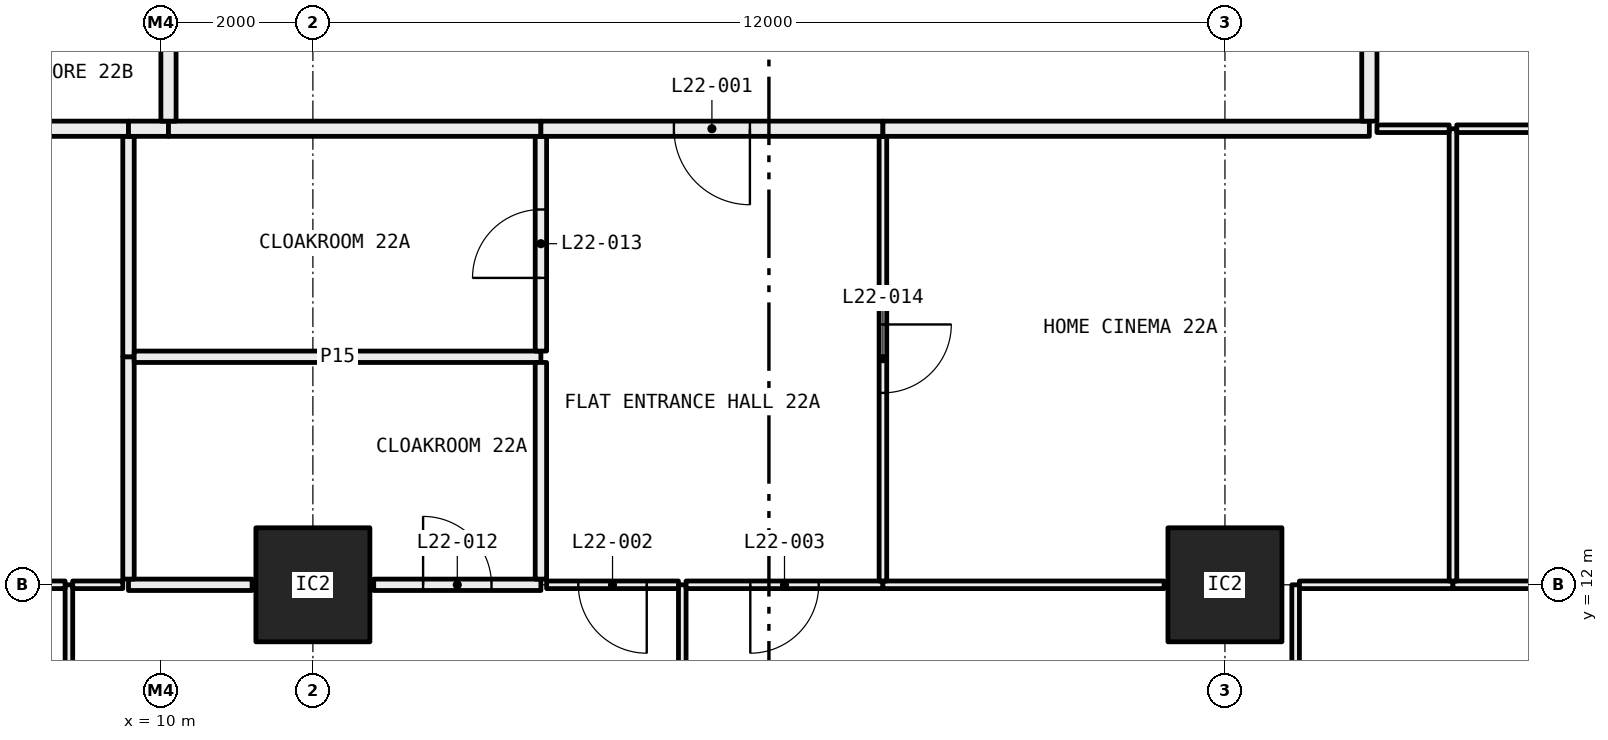
"""IFC4 building model, lengths in metres.
Left out: names, types, materials, properties, quantities, classifications, styles, units other than length and angle.
Written with IfcOpenShell. Run it as: python <this file> out.ifc"""

import sys

from ifc_helpers import new_model, si_unit, direction, frame, frame_2d, origin, origin_2d, place, context, subcontext, project, spatial, rectangle, hollow_rectangle, extrude, element, fill, save


model = new_model("IFC4")
c1 = context("Model", 3, precision=1e-05, world=origin(), true_north=direction((0.0, 1.0)))
c2 = subcontext(c1, "Body", "Model", "MODEL_VIEW")
j1 = project(units=[si_unit("LENGTHUNIT", "METRE"), si_unit("PLANEANGLEUNIT", "RADIAN")], contexts=[c1])
p1 = place(None, origin())
s1 = spatial("IfcSite", under=j1, at=p1, CompositionType="ELEMENT")
p2 = place(p1, origin())
s2 = spatial("IfcBuilding", under=s1, at=p2, CompositionType="ELEMENT")
p3 = place(p2, frame((0.0, 0.0, 88.65)))
s3 = spatial("IfcBuildingStorey", under=s2, at=p3, CompositionType="ELEMENT", Elevation=88.65)
for number, where, z_axis, x_axis in (
    (1, (12.0, 12.0, 0.0), (0.0, 0.0, 1.0), (1.0, 0.0, 0.0)),
    (2, (24.0, 12.0, 0.0), (0.0, 0.0, 1.0), (1.0, 0.0, 0.0)),
):
    element("IfcColumn", number, at=place(p3, frame(where, z_axis=z_axis, x_axis=x_axis)), inside=s3, PredefinedType="COLUMN", context=c2, shape_type="SweptSolid", body=[
        extrude(hollow_rectangle(XDim=1.5, YDim=1.5, WallThickness=0.065, at=origin_2d()), origin(), (0.0, 0.0, 1.0), 3.05),
    ])
p4 = place(p3, frame((8.79, 6.05, 0.0), z_axis=(0.0, 0.0, 1.0), x_axis=(0.0, 1.0, 0.0)))
e3 = element("IfcWall", 3, at=p4, inside=s3, PredefinedType="PARTITIONING", context=c2, shape_type="SweptSolid", body=[
    extrude(rectangle(XDim=5.95, YDim=0.1, at=frame_2d((2.975, 0.0))), origin(), (0.0, 0.0, 1.0), 2.45),
])
p5 = place(p4, frame((2.525, 0.0, 0.0)))
e4 = element("IfcOpeningElement", 4, at=p5, cuts=e3, PredefinedType="OPENING", context=c2, shape_type="SweptSolid", body=[
    extrude(rectangle(XDim=0.9, YDim=2.1, at=frame_2d((0.45, 1.05))), frame((0.0, 0.06, 0.0), z_axis=(0.0, -1.0, 0.0), x_axis=(1.0, 0.0, 0.0)), (0.0, 0.0, 1.0), 0.12),
])
p6 = place(p3, frame((8.74, 12.0, 0.0), z_axis=(0.0, 0.0, 1.0), x_axis=(-1.0, 0.0, 0.0)))
e5 = element("IfcWall", 5, at=p6, inside=s3, PredefinedType="PARTITIONING", context=c2, shape_type="SweptSolid", body=[
    extrude(rectangle(XDim=8.02, YDim=0.1, at=frame_2d((4.01, 0.0))), origin(), (0.0, 0.0, 1.0), 2.45),
])
p7 = place(p6, frame((3.56, 0.0, 0.0)))
e6 = element("IfcOpeningElement", 6, at=p7, cuts=e5, PredefinedType="OPENING", context=c2, shape_type="SweptSolid", body=[
    extrude(rectangle(XDim=0.9, YDim=2.1, at=frame_2d((0.45, 1.05))), frame((0.0, 0.06, 0.0), z_axis=(0.0, -1.0, 0.0), x_axis=(1.0, 0.0, 0.0)), (0.0, 0.0, 1.0), 0.12),
])
p8 = place(p3, frame((16.86, 6.05, 0.0), z_axis=(0.0, 0.0, 1.0), x_axis=(0.0, 1.0, 0.0)))
e7 = element("IfcWall", 7, at=p8, inside=s3, PredefinedType="PARTITIONING", context=c2, shape_type="SweptSolid", body=[
    extrude(rectangle(XDim=5.95, YDim=0.1, at=frame_2d((2.975, 0.0))), origin(), (0.0, 0.0, 1.0), 2.45),
])
p9 = place(p3, frame((9.499, 12.0, 0.0), z_axis=(0.0, 0.0, 1.0), x_axis=(-1.0, 0.0, 0.0)))
e8 = element("IfcWall", 8, at=p9, inside=s3, PredefinedType="PARTITIONING", context=c2, shape_type="SweptSolid", body=[
    extrude(rectangle(XDim=0.659, YDim=0.1, at=frame_2d((0.33, 0.0))), origin(), (0.0, 0.0, 1.0), 2.45),
])
p10 = place(p3, frame((11.2, 12.0, 0.0), z_axis=(0.0, 0.0, 1.0), x_axis=(-1.0, 0.0, 0.0)))
e9 = element("IfcWall", 9, at=p10, inside=s3, PredefinedType="PARTITIONING", context=c2, shape_type="SweptSolid", body=[
    extrude(rectangle(XDim=1.626, YDim=0.15, at=frame_2d((0.813, 0.0))), origin(), (0.0, 0.0, 1.0), 2.45),
])
p11 = place(p3, frame((15.0, 12.0, 0.0), z_axis=(0.0, 0.0, 1.0), x_axis=(-1.0, 0.0, 0.0)))
e10 = element("IfcWall", 10, at=p11, inside=s3, PredefinedType="PARTITIONING", context=c2, shape_type="SweptSolid", body=[
    extrude(rectangle(XDim=2.2, YDim=0.15, at=frame_2d((1.1, 0.0))), origin(), (0.0, 0.0, 1.0), 2.45),
])
p12 = place(p11, frame((0.65, 0.0, 0.0)))
e11 = element("IfcOpeningElement", 11, at=p12, cuts=e10, PredefinedType="OPENING", context=c2, shape_type="SweptSolid", body=[
    extrude(rectangle(XDim=0.9, YDim=2.1, at=frame_2d((0.45, 1.05))), frame((0.0, 0.085, 0.0), z_axis=(0.0, -1.0, 0.0), x_axis=(1.0, 0.0, 0.0)), (0.0, 0.0, 1.0), 0.17),
])
p13 = place(p3, frame((16.81, 12.0, 0.0), z_axis=(0.0, 0.0, 1.0), x_axis=(-1.0, 0.0, 0.0)))
e12 = element("IfcWall", 12, at=p13, inside=s3, PredefinedType="PARTITIONING", context=c2, shape_type="SweptSolid", body=[
    extrude(rectangle(XDim=1.735, YDim=0.1, at=frame_2d((0.868, 0.0))), origin(), (0.0, 0.0, 1.0), 2.45),
])
p14 = place(p13, frame((0.417, 0.0, 0.0)))
e13 = element("IfcOpeningElement", 13, at=p14, cuts=e12, PredefinedType="OPENING", context=c2, shape_type="SweptSolid", body=[
    extrude(rectangle(XDim=0.9, YDim=2.1, at=frame_2d((0.45, 1.05))), frame((0.0, 0.06, 0.0), z_axis=(0.0, -1.0, 0.0), x_axis=(1.0, 0.0, 0.0)), (0.0, 0.0, 1.0), 0.12),
])
p15 = place(p3, frame((24.93, 6.05, 0.0), z_axis=(0.0, 0.0, 1.0), x_axis=(0.0, 1.0, 0.0)))
e14 = element("IfcWall", 14, at=p15, inside=s3, PredefinedType="PARTITIONING", context=c2, shape_type="SweptSolid", body=[
    extrude(rectangle(XDim=5.95, YDim=0.1, at=frame_2d((2.975, 0.0))), origin(), (0.0, 0.0, 1.0), 2.45),
])
p16 = place(p15, frame((2.525, 0.0, 0.0)))
e15 = element("IfcOpeningElement", 15, at=p16, cuts=e14, PredefinedType="OPENING", context=c2, shape_type="SweptSolid", body=[
    extrude(rectangle(XDim=0.9, YDim=2.1, at=frame_2d((0.45, 1.05))), frame((0.0, 0.06, 0.0), z_axis=(0.0, -1.0, 0.0), x_axis=(1.0, 0.0, 0.0)), (0.0, 0.0, 1.0), 0.12),
])
p17 = place(p3, frame((19.5, 12.0, 0.0), z_axis=(0.0, 0.0, 1.0), x_axis=(-1.0, 0.0, 0.0)))
e16 = element("IfcWall", 16, at=p17, inside=s3, PredefinedType="PARTITIONING", context=c2, shape_type="SweptSolid", body=[
    extrude(rectangle(XDim=2.59, YDim=0.1, at=frame_2d((1.295, 0.0))), origin(), (0.0, 0.0, 1.0), 2.45),
])
p18 = place(p17, frame((0.845, 0.0, 0.0)))
e17 = element("IfcOpeningElement", 17, at=p18, cuts=e16, PredefinedType="OPENING", context=c2, shape_type="SweptSolid", body=[
    extrude(rectangle(XDim=0.9, YDim=2.1, at=frame_2d((0.45, 1.05))), frame((0.0, 0.06, 0.0), z_axis=(0.0, -1.0, 0.0), x_axis=(1.0, 0.0, 0.0)), (0.0, 0.0, 1.0), 0.12),
])
p19 = place(p3, frame((23.2, 12.0, 0.0), z_axis=(0.0, 0.0, 1.0), x_axis=(-1.0, 0.0, 0.0)))
e18 = element("IfcWall", 18, at=p19, inside=s3, PredefinedType="PARTITIONING", context=c2, shape_type="SweptSolid", body=[
    extrude(rectangle(XDim=3.7, YDim=0.1, at=frame_2d((1.85, 0.0))), origin(), (0.0, 0.0, 1.0), 2.45),
])
p20 = place(p3, frame((27.0, 12.0, 0.0), z_axis=(0.0, 0.0, 1.0), x_axis=(-1.0, 0.0, 0.0)))
e19 = element("IfcWall", 19, at=p20, inside=s3, PredefinedType="PARTITIONING", context=c2, shape_type="SweptSolid", body=[
    extrude(rectangle(XDim=2.02, YDim=0.1, at=frame_2d((1.01, 0.0))), origin(), (0.0, 0.0, 1.0), 2.45),
])
p21 = place(p3, frame((32.95, 12.0, 0.0), z_axis=(0.0, 0.0, 1.0), x_axis=(-1.0, 0.0, 0.0)))
e20 = element("IfcWall", 20, at=p21, inside=s3, PredefinedType="PARTITIONING", context=c2, shape_type="SweptSolid", body=[
    extrude(rectangle(XDim=5.95, YDim=0.1, at=frame_2d((2.975, 0.0))), origin(), (0.0, 0.0, 1.0), 2.45),
])
p22 = place(p21, frame((2.525, 0.0, 0.0)))
e21 = element("IfcOpeningElement", 21, at=p22, cuts=e20, PredefinedType="OPENING", context=c2, shape_type="SweptSolid", body=[
    extrude(rectangle(XDim=0.9, YDim=2.1, at=frame_2d((0.45, 1.05))), frame((0.0, 0.06, 0.0), z_axis=(0.0, -1.0, 0.0), x_axis=(1.0, 0.0, 0.0)), (0.0, 0.0, 1.0), 0.12),
])
p23 = place(p3, frame((9.574, 12.075, 0.0), z_axis=(0.0, 0.0, 1.0), x_axis=(0.0, 1.0, 0.0)))
e22 = element("IfcWall", 22, at=p23, inside=s3, PredefinedType="PARTITIONING", context=c2, shape_type="SweptSolid", body=[
    extrude(rectangle(XDim=2.925, YDim=0.15, at=frame_2d((1.462, 0.0))), origin(), (0.0, 0.0, 1.0), 2.45),
])
p24 = place(p3, frame((9.574, 15.0, 0.0), z_axis=(0.0, 0.0, 1.0), x_axis=(0.0, 1.0, 0.0)))
e23 = element("IfcWall", 23, at=p24, inside=s3, PredefinedType="PARTITIONING", context=c2, shape_type="SweptSolid", body=[
    extrude(rectangle(XDim=2.9, YDim=0.15, at=frame_2d((1.45, 0.0))), origin(), (0.0, 0.0, 1.0), 3.05),
])
p25 = place(p3, frame((9.574, 18.0, 0.0), z_axis=(0.0, 0.0, 1.0), x_axis=(-1.0, 0.0, 0.0)))
e24 = element("IfcWall", 24, at=p25, inside=s3, PredefinedType="PARTITIONING", context=c2, shape_type="SweptSolid", body=[
    extrude(rectangle(XDim=1.774, YDim=0.2, at=frame_2d((0.887, 0.0))), origin(), (0.0, 0.0, 1.0), 3.05),
])
p26 = place(p3, frame((15.0, 15.0, 0.0), z_axis=(0.0, 0.0, 1.0), x_axis=(-1.0, 0.0, 0.0)))
e25 = element("IfcWall", 25, at=p26, inside=s3, PredefinedType="PARTITIONING", context=c2, shape_type="SweptSolid", body=[
    extrude(rectangle(XDim=5.351, YDim=0.15, at=frame_2d((2.676, 0.0))), origin(), (0.0, 0.0, 1.0), 3.05),
])
p27 = place(p3, frame((15.0, 12.075, 0.0), z_axis=(0.0, 0.0, 1.0), x_axis=(0.0, 1.0, 0.0)))
e26 = element("IfcWall", 26, at=p27, inside=s3, PredefinedType="PARTITIONING", context=c2, shape_type="SweptSolid", body=[
    extrude(rectangle(XDim=2.85, YDim=0.15, at=frame_2d((1.425, 0.0))), origin(), (0.0, 0.0, 1.0), 2.45),
])
p28 = place(p3, frame((15.0, 15.075, 0.0), z_axis=(0.0, 0.0, 1.0), x_axis=(0.0, 1.0, 0.0)))
e27 = element("IfcWall", 27, at=p28, inside=s3, PredefinedType="PARTITIONING", context=c2, shape_type="SweptSolid", body=[
    extrude(rectangle(XDim=2.825, YDim=0.15, at=frame_2d((1.413, 0.0))), origin(), (0.0, 0.0, 1.0), 3.05),
])
p29 = place(p28, frame((0.962, 0.0, 0.0)))
e28 = element("IfcOpeningElement", 28, at=p29, cuts=e27, PredefinedType="OPENING", context=c2, shape_type="SweptSolid", body=[
    extrude(rectangle(XDim=0.9, YDim=2.1, at=frame_2d((0.45, 1.05))), frame((0.0, 0.085, 0.0), z_axis=(0.0, -1.0, 0.0), x_axis=(1.0, 0.0, 0.0)), (0.0, 0.0, 1.0), 0.17),
])
p30 = place(p3, frame((10.1, 18.0, 0.0), z_axis=(0.0, 0.0, 1.0), x_axis=(-1.0, 0.0, 0.0)))
e29 = element("IfcWall", 29, at=p30, inside=s3, PredefinedType="PARTITIONING", context=c2, shape_type="SweptSolid", body=[
    extrude(rectangle(XDim=0.526, YDim=0.2, at=frame_2d((0.263, 0.0))), origin(), (0.0, 0.0, 1.0), 3.05),
])
p31 = place(p3, frame((15.0, 18.0, 0.0), z_axis=(0.0, 0.0, 1.0), x_axis=(-1.0, 0.0, 0.0)))
e30 = element("IfcWall", 30, at=p31, inside=s3, PredefinedType="PARTITIONING", context=c2, shape_type="SweptSolid", body=[
    extrude(rectangle(XDim=4.9, YDim=0.2, at=frame_2d((2.45, 0.0))), origin(), (0.0, 0.0, 1.0), 3.05),
])
p32 = place(p3, frame((19.5, 12.05, 0.0), z_axis=(0.0, 0.0, 1.0), x_axis=(0.0, 1.0, 0.0)))
e31 = element("IfcWall", 31, at=p32, inside=s3, PredefinedType="PARTITIONING", context=c2, shape_type="SweptSolid", body=[
    extrude(rectangle(XDim=5.85, YDim=0.1, at=frame_2d((2.925, 0.0))), origin(), (0.0, 0.0, 1.0), 2.45),
])
p33 = place(p32, frame((2.475, 0.0, 0.0)))
e32 = element("IfcOpeningElement", 32, at=p33, cuts=e31, PredefinedType="OPENING", context=c2, shape_type="SweptSolid", body=[
    extrude(rectangle(XDim=0.9, YDim=2.1, at=frame_2d((0.45, 1.05))), frame((0.0, 0.06, 0.0), z_axis=(0.0, -1.0, 0.0), x_axis=(1.0, 0.0, 0.0)), (0.0, 0.0, 1.0), 0.12),
])
p34 = place(p3, frame((19.5, 18.0, 0.0), z_axis=(0.0, 0.0, 1.0), x_axis=(-1.0, 0.0, 0.0)))
e33 = element("IfcWall", 33, at=p34, inside=s3, PredefinedType="PARTITIONING", context=c2, shape_type="SweptSolid", body=[
    extrude(rectangle(XDim=4.5, YDim=0.2, at=frame_2d((2.25, 0.0))), origin(), (0.0, 0.0, 1.0), 3.05),
])
p35 = place(p34, frame((1.75, 0.0, 0.0)))
e34 = element("IfcOpeningElement", 34, at=p35, cuts=e33, PredefinedType="OPENING", context=c2, shape_type="SweptSolid", body=[
    extrude(rectangle(XDim=1.0, YDim=2.1, at=frame_2d((0.5, 1.05))), frame((0.0, 0.11, 0.0), z_axis=(0.0, -1.0, 0.0), x_axis=(1.0, 0.0, 0.0)), (0.0, 0.0, 1.0), 0.22),
])
p36 = place(p3, frame((27.0, 12.05, 0.0), z_axis=(0.0, 0.0, 1.0), x_axis=(0.0, 1.0, 0.0)))
e35 = element("IfcWall", 35, at=p36, inside=s3, PredefinedType="PARTITIONING", context=c2, shape_type="SweptSolid", body=[
    extrude(rectangle(XDim=5.95, YDim=0.1, at=frame_2d((2.975, 0.0))), origin(), (0.0, 0.0, 1.0), 2.45),
])
p37 = place(p3, frame((26.95, 18.0, 0.0), z_axis=(0.0, 0.0, 1.0), x_axis=(-1.0, 0.0, 0.0)))
e36 = element("IfcWall", 36, at=p37, inside=s3, PredefinedType="PARTITIONING", context=c2, shape_type="SweptSolid", body=[
    extrude(rectangle(XDim=0.95, YDim=0.1, at=frame_2d((0.475, 0.0))), origin(), (0.0, 0.0, 1.0), 3.05),
])
p38 = place(p3, frame((25.9, 18.0, 0.0), z_axis=(0.0, 0.0, 1.0), x_axis=(-1.0, 0.0, 0.0)))
e37 = element("IfcWall", 37, at=p38, inside=s3, PredefinedType="PARTITIONING", context=c2, shape_type="SweptSolid", body=[
    extrude(rectangle(XDim=6.4, YDim=0.2, at=frame_2d((3.2, 0.0))), origin(), (0.0, 0.0, 1.0), 3.05),
])
p39 = place(p3, frame((30.0, 18.0, 0.0), z_axis=(0.0, 0.0, 1.0), x_axis=(-1.0, 0.0, 0.0)))
e38 = element("IfcWall", 38, at=p39, inside=s3, PredefinedType="PARTITIONING", context=c2, shape_type="SweptSolid", body=[
    extrude(rectangle(XDim=2.95, YDim=0.1, at=frame_2d((1.475, 0.0))), origin(), (0.0, 0.0, 1.0), 3.05),
])
p40 = place(p39, frame((1.025, 0.0, 0.0)))
e39 = element("IfcOpeningElement", 39, at=p40, cuts=e38, PredefinedType="OPENING", context=c2, shape_type="SweptSolid", body=[
    extrude(rectangle(XDim=0.9, YDim=2.1, at=frame_2d((0.45, 1.05))), frame((0.0, 0.06, 0.0), z_axis=(0.0, -1.0, 0.0), x_axis=(1.0, 0.0, 0.0)), (0.0, 0.0, 1.0), 0.12),
])
p41 = place(p3, frame((25.9, 23.9, 0.0), z_axis=(0.0, 0.0, 1.0), x_axis=(0.0, -1.0, 0.0)))
e40 = element("IfcWall", 40, at=p41, inside=s3, PredefinedType="PARTITIONING", context=c2, shape_type="SweptSolid", body=[
    extrude(rectangle(XDim=5.8, YDim=0.2, at=frame_2d((2.9, 0.0))), origin(), (0.0, 0.0, 1.0), 3.05),
])
p42 = place(p3, frame((10.1, 18.1, 0.0), z_axis=(0.0, 0.0, 1.0), x_axis=(0.0, 1.0, 0.0)))
e41 = element("IfcWall", 41, at=p42, inside=s3, PredefinedType="PARTITIONING", context=c2, shape_type="SweptSolid", body=[
    extrude(rectangle(XDim=2.9, YDim=0.2, at=frame_2d((1.45, 0.0))), origin(), (0.0, 0.0, 1.0), 3.05),
])
p43 = place(p35, origin())
e42 = element("IfcDoor", 42, at=p43, inside=s3, OperationType="SINGLE_SWING_RIGHT", PredefinedType="DOOR", context=c2, shape_type="SweptSolid", body=[
    extrude(rectangle(XDim=1.0, YDim=2.1, at=frame_2d((0.5, 1.05))), frame((0.0, 0.025, 0.0), z_axis=(0.0, -1.0, 0.0), x_axis=(1.0, 0.0, 0.0)), (0.0, 0.0, 1.0), 0.05),
])
fill(e34, e42)
p44 = place(p14, origin())
e43 = element("IfcDoor", 43, at=p44, inside=s3, OperationType="SINGLE_SWING_RIGHT", PredefinedType="DOOR", context=c2, shape_type="SweptSolid", body=[
    extrude(rectangle(XDim=0.9, YDim=2.1, at=frame_2d((0.45, 1.05))), frame((0.0, 0.025, 0.0), z_axis=(0.0, -1.0, 0.0), x_axis=(1.0, 0.0, 0.0)), (0.0, 0.0, 1.0), 0.05),
])
fill(e13, e43)
p45 = place(p18, origin())
e44 = element("IfcDoor", 44, at=p45, inside=s3, OperationType="SINGLE_SWING_LEFT", PredefinedType="DOOR", context=c2, shape_type="SweptSolid", body=[
    extrude(rectangle(XDim=0.9, YDim=2.1, at=frame_2d((0.45, 1.05))), frame((0.0, 0.025, 0.0), z_axis=(0.0, -1.0, 0.0), x_axis=(1.0, 0.0, 0.0)), (0.0, 0.0, 1.0), 0.05),
])
fill(e17, e44)
p46 = place(p12, frame((0.9, 0.0, 0.0), x_axis=(-1.0, 0.0, 0.0)))
e45 = element("IfcDoor", 45, at=p46, inside=s3, OperationType="SINGLE_SWING_RIGHT", PredefinedType="DOOR", context=c2, shape_type="SweptSolid", body=[
    extrude(rectangle(XDim=0.9, YDim=2.1, at=frame_2d((0.45, 1.05))), frame((0.0, 0.025, 0.0), z_axis=(0.0, -1.0, 0.0), x_axis=(1.0, 0.0, 0.0)), (0.0, 0.0, 1.0), 0.05),
])
fill(e11, e45)
p47 = place(p29, origin())
e46 = element("IfcDoor", 46, at=p47, inside=s3, OperationType="SINGLE_SWING_RIGHT", PredefinedType="DOOR", context=c2, shape_type="SweptSolid", body=[
    extrude(rectangle(XDim=0.9, YDim=2.1, at=frame_2d((0.45, 1.05))), frame((0.0, 0.025, 0.0), z_axis=(0.0, -1.0, 0.0), x_axis=(1.0, 0.0, 0.0)), (0.0, 0.0, 1.0), 0.05),
])
fill(e28, e46)
p48 = place(p33, frame((0.9, 0.0, 0.0), x_axis=(-1.0, 0.0, 0.0)))
e47 = element("IfcDoor", 47, at=p48, inside=s3, OperationType="SINGLE_SWING_RIGHT", PredefinedType="DOOR", context=c2, shape_type="SweptSolid", body=[
    extrude(rectangle(XDim=0.9, YDim=2.1, at=frame_2d((0.45, 1.05))), frame((0.0, 0.025, 0.0), z_axis=(0.0, -1.0, 0.0), x_axis=(1.0, 0.0, 0.0)), (0.0, 0.0, 1.0), 0.05),
])
fill(e32, e47)
save(model, sys.argv[1])
